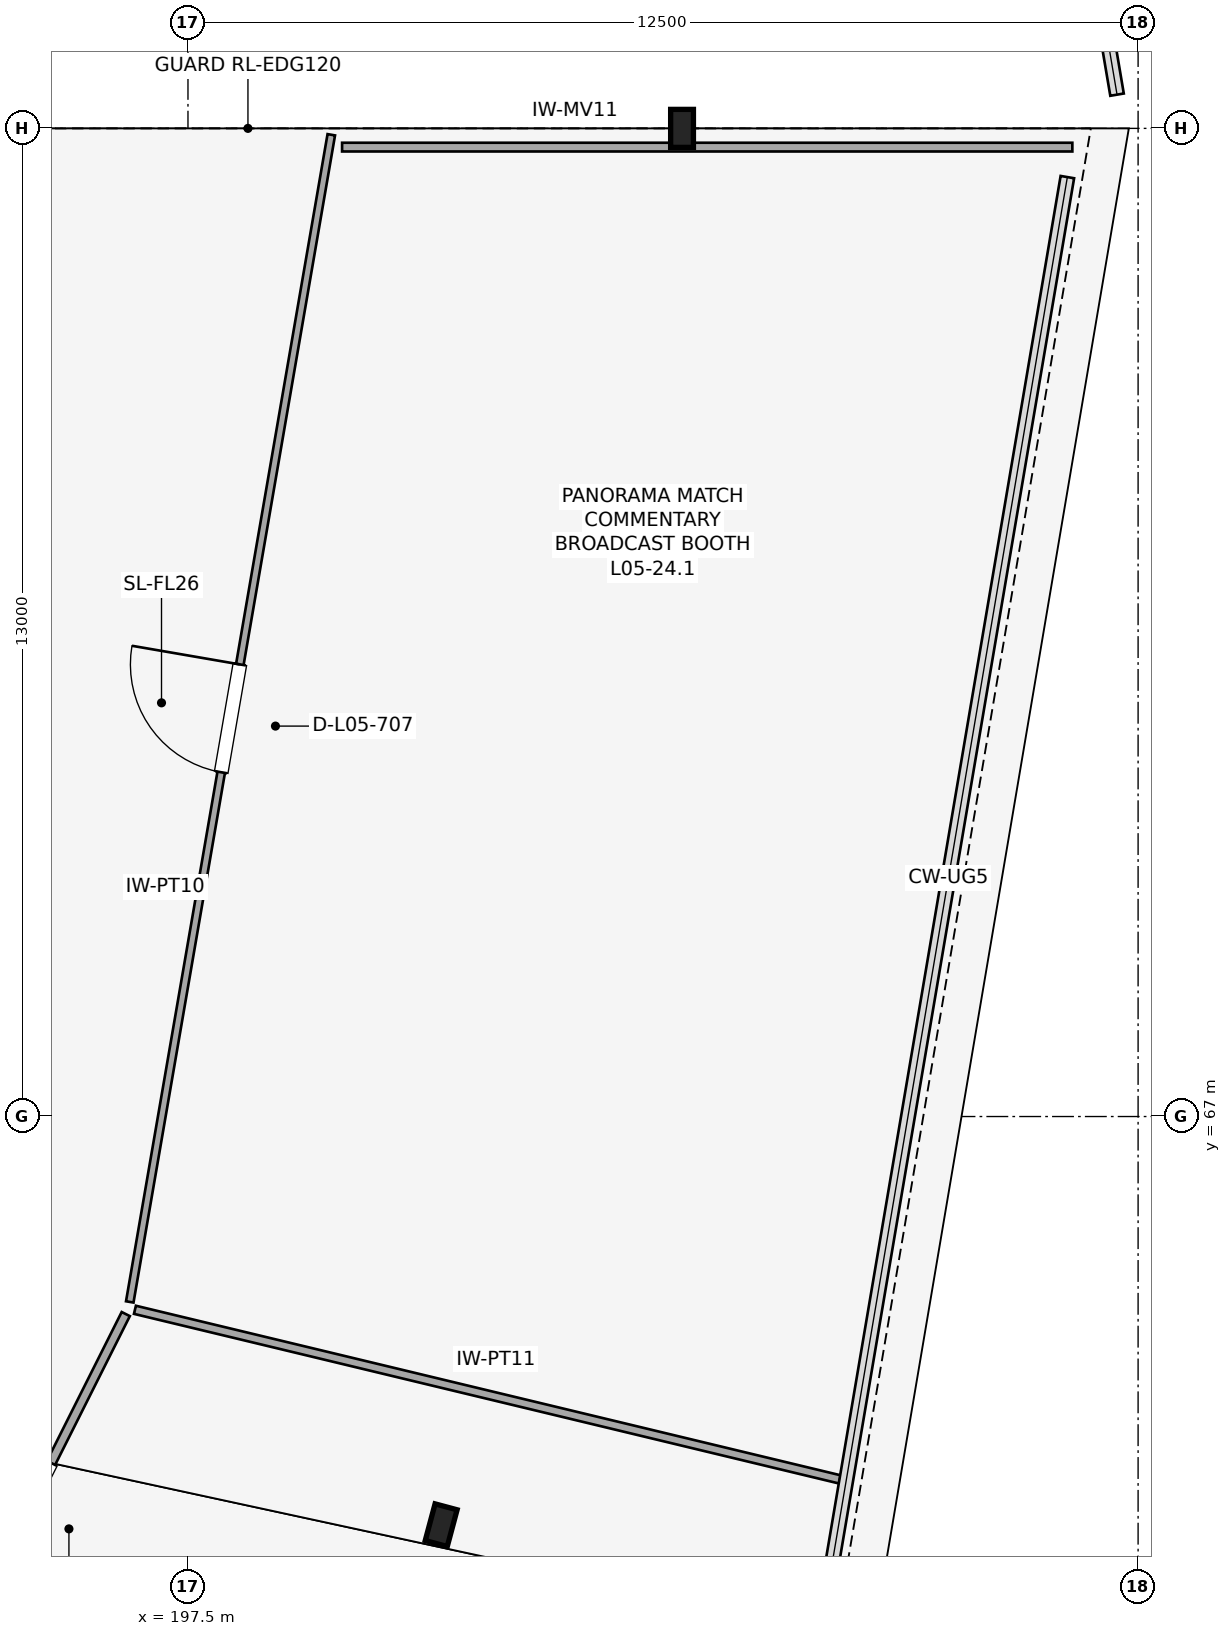
"""IFC4 building model, lengths in metres.
Left out: names, types, materials, properties, quantities, classifications, styles, units other than length and angle.
Written with IfcOpenShell. Run it as: python <this file> out.ifc"""

import sys

from ifc_helpers import new_model, si_unit, direction, frame, frame_2d, origin, origin_2d, place, context, subcontext, project, spatial, rectangle, i_section, extrude, element, fill, save


model = new_model("IFC4")
c1 = context("Model", 3, precision=1e-05, world=origin(), true_north=direction((0.0, 1.0)))
c2 = subcontext(c1, "Body", "Model", "MODEL_VIEW")
j1 = project(units=[si_unit("LENGTHUNIT", "METRE"), si_unit("PLANEANGLEUNIT", "RADIAN")], contexts=[c1])
p1 = place(None, origin())
s1 = spatial("IfcSite", under=j1, at=p1, CompositionType="ELEMENT")
p2 = place(p1, origin())
s2 = spatial("IfcBuilding", under=s1, at=p2, CompositionType="ELEMENT")
p3 = place(p2, frame((0.0, 0.0, 26.2)))
s3 = spatial("IfcBuildingStorey", under=s2, at=p3, CompositionType="ELEMENT", Elevation=26.2)
for number, where, z_axis, x_axis in (
    (1, (204.0, 80.0, 0.0), (0.0, 0.0, 1.0), (1.0, 0.0, 0.0)),
    (2, (200.831, 61.624, 0.0), (0.0, 0.0, 1.0), (0.966, -0.259, 0.0)),
):
    element("IfcColumn", number, at=place(p3, frame(where, z_axis=z_axis, x_axis=x_axis)), inside=s3, PredefinedType="COLUMN", context=c2, shape_type="SweptSolid", body=[
        extrude(i_section(OverallWidth=0.3, OverallDepth=0.5, WebThickness=0.014, FlangeThickness=0.028, FilletRadius=0.027, at=origin_2d()), origin(), (0.0, 0.0, 1.0), 5.6),
    ])
p4 = place(p3, frame((194.114, 59.288, 0.0), z_axis=(0.0, 0.0, 1.0), x_axis=(0.448731906193, 0.893666423429, 0.0)))
e3 = element("IfcWall", 3, at=p4, inside=s3, PredefinedType="PARTITIONING", context=c2, shape_type="SweptSolid", body=[
    extrude(rectangle(XDim=5.722, YDim=0.12, at=frame_2d((2.861, 0.0))), origin(), (0.0, 0.0, 1.0), 4.1),
])
p5 = place(p4, frame((2.191, 0.0, 0.0)))
e4 = element("IfcOpeningElement", 4, at=p5, cuts=e3, PredefinedType="OPENING", context=c2, shape_type="SweptSolid", body=[
    extrude(rectangle(XDim=1.34, YDim=2.1, at=frame_2d((0.67, 1.05))), frame((0.0, 0.07, 0.0), z_axis=(0.0, -1.0, 0.0), x_axis=(1.0, 0.0, 0.0)), (0.0, 0.0, 1.0), 0.14),
])
p6 = place(p3, frame((196.802, 64.457, 0.0), z_axis=(0.0, 0.0, 1.0), x_axis=(0.972258678705, -0.233908233466, 0.0)))
e5 = element("IfcWall", 5, at=p6, inside=s3, PredefinedType="PARTITIONING", context=c2, shape_type="SweptSolid", body=[
    extrude(rectangle(XDim=9.539, YDim=0.11, at=frame_2d((4.77, 0.0))), origin(), (0.0, 0.0, 1.0), 4.1),
])
p7 = place(p3, frame((196.734, 64.561, 0.0), z_axis=(0.0, 0.0, 1.0), x_axis=(0.170150881869, 0.985418021653, 0.0)))
e6 = element("IfcWall", 6, at=p7, inside=s3, PredefinedType="PARTITIONING", context=c2, shape_type="SweptSolid", body=[
    extrude(rectangle(XDim=15.583, YDim=0.1, at=frame_2d((7.791, 0.0))), origin(), (0.0, 0.0, 1.0), 4.1),
])
p8 = place(p7, frame((7.071, 0.0, 0.0)))
e7 = element("IfcOpeningElement", 7, at=p8, cuts=e6, PredefinedType="OPENING", context=c2, shape_type="SweptSolid", body=[
    extrude(rectangle(XDim=1.44, YDim=2.24, at=frame_2d((0.72, 1.12))), frame((0.0, 0.06, 0.0), z_axis=(0.0, -1.0, 0.0), x_axis=(1.0, 0.0, 0.0)), (0.0, 0.0, 1.0), 0.12),
])
p9 = place(p3, frame((199.528, 79.754, 0.0), z_axis=(0.0, 0.0, 1.0), x_axis=(0.999999999677, -2.5411669e-05, 0.0)))
e8 = element("IfcWall", 8, at=p9, inside=s3, PredefinedType="MOVABLE", context=c2, shape_type="SweptSolid", body=[
    extrude(rectangle(XDim=9.607, YDim=0.115, at=frame_2d((4.804, 0.0))), origin(), (0.0, 0.0, 1.0), 4.1),
])
p10 = place(p5, origin())
e9 = element("IfcDoor", 9, at=p10, inside=s3, OperationType="SINGLE_SWING_LEFT", PredefinedType="DOOR", context=c2, shape_type="SweptSolid", body=[
    extrude(rectangle(XDim=1.34, YDim=2.1, at=frame_2d((0.67, 1.05))), frame((0.0, 0.025, 0.0), z_axis=(0.0, -1.0, 0.0), x_axis=(1.0, 0.0, 0.0)), (0.0, 0.0, 1.0), 0.05),
])
fill(e4, e9)
p11 = place(p8, origin())
e10 = element("IfcDoor", 10, at=p11, inside=s3, OperationType="SINGLE_SWING_RIGHT", PredefinedType="DOOR", context=c2, shape_type="SweptSolid", body=[
    extrude(rectangle(XDim=1.44, YDim=2.24, at=frame_2d((0.72, 1.12))), frame((0.0, 0.025, 0.0), z_axis=(0.0, -1.0, 0.0), x_axis=(1.0, 0.0, 0.0)), (0.0, 0.0, 1.0), 0.05),
])
fill(e7, e10)
save(model, sys.argv[1])
